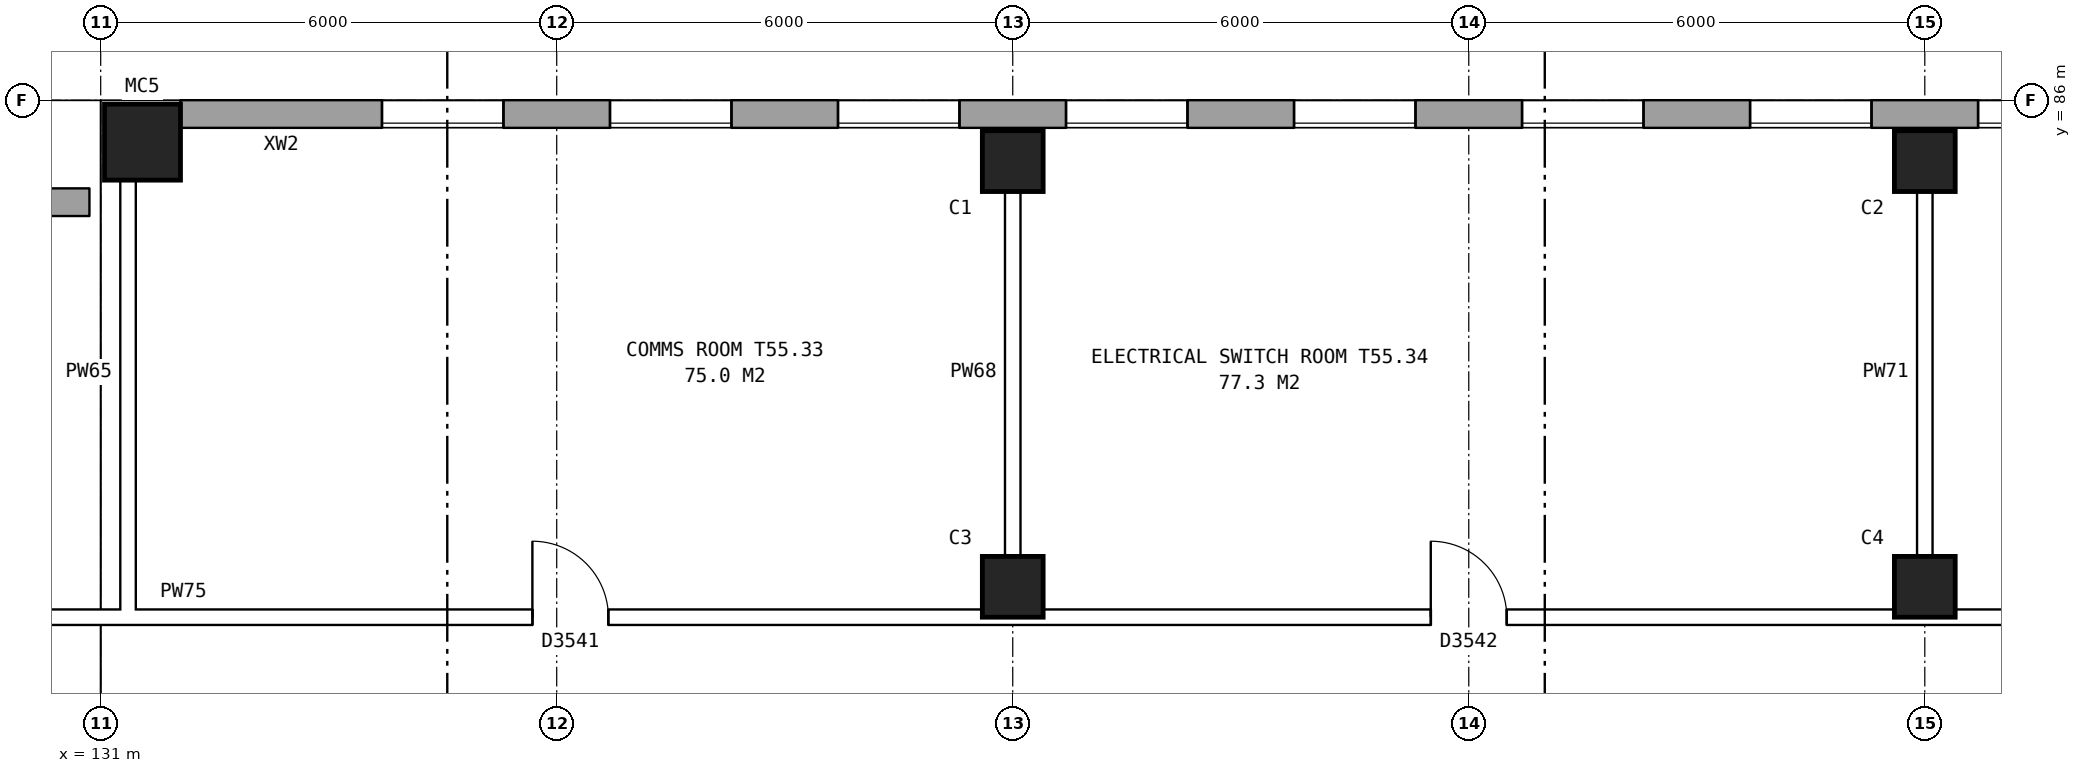
"""IFC4 building model, lengths in metres.
Left out: names, types, materials, properties, quantities, classifications, styles, units other than length and angle.
Written with IfcOpenShell. Run it as: python <this file> out.ifc"""

import sys

from ifc_helpers import new_model, si_unit, direction, frame, frame_2d, origin, origin_2d, place, context, subcontext, project, spatial, rectangle, hollow_rectangle, extrude, element, fill, save


model = new_model("IFC4")
c1 = context("Model", 3, precision=1e-05, world=origin(), true_north=direction((0.0, 1.0)))
c2 = subcontext(c1, "Body", "Model", "MODEL_VIEW")
j1 = project(units=[si_unit("LENGTHUNIT", "METRE"), si_unit("PLANEANGLEUNIT", "RADIAN")], contexts=[c1])
p1 = place(None, origin())
s1 = spatial("IfcSite", under=j1, at=p1, CompositionType="ELEMENT")
p2 = place(p1, origin())
s2 = spatial("IfcBuilding", under=s1, at=p2, CompositionType="ELEMENT")
p3 = place(p2, frame((0.0, 0.0, 194.4)))
s3 = spatial("IfcBuildingStorey", under=s2, at=p3, CompositionType="ELEMENT", Elevation=194.4)
for number, where, z_axis, x_axis in (
    (1, (143.0, 79.6, 0.0), (0.0, 0.0, 1.0), (1.0, 0.0, 0.0)),
    (2, (143.0, 85.2, 0.0), (0.0, 0.0, 1.0), (1.0, 0.0, 0.0)),
    (3, (155.0, 79.6, 0.0), (0.0, 0.0, 1.0), (1.0, 0.0, 0.0)),
    (4, (155.0, 85.2, 0.0), (0.0, 0.0, 1.0), (1.0, 0.0, 0.0)),
):
    element("IfcColumn", number, at=place(p3, frame(where, z_axis=z_axis, x_axis=x_axis)), inside=s3, PredefinedType="COLUMN", context=c2, shape_type="SweptSolid", body=[
        extrude(rectangle(XDim=0.8, YDim=0.8, at=origin_2d()), origin(), (0.0, 0.0, 1.0), 3.95),
    ])
p4 = place(p3, frame((131.55, 85.45, 0.0), z_axis=(0.0, 0.0, 1.0), x_axis=(1.0, 0.0, 0.0)))
e5 = element("IfcColumn", 5, at=p4, inside=s3, PredefinedType="COLUMN", context=c2, shape_type="SweptSolid", body=[
    extrude(hollow_rectangle(XDim=1.0, YDim=1.0, WallThickness=0.055, at=origin_2d()), origin(), (0.0, 0.0, 1.0), 4.2),
])
p5 = place(p3, frame((165.925, 85.82, 0.0), z_axis=(0.0, 0.0, 1.0), x_axis=(-1.0, 0.0, 0.0)))
e6 = element("IfcWall", 6, at=p5, inside=s3, PredefinedType="STANDARD", context=c2, shape_type="SweptSolid", body=[
    extrude(rectangle(XDim=33.875, YDim=0.36, at=frame_2d((16.938, 0.0))), origin(), (0.0, 0.0, 1.0), 3.95),
])
p6 = place(p5, frame((2.625, 0.0, 1.5)))
e7 = element("IfcOpeningElement", 7, at=p6, cuts=e6, PredefinedType="OPENING", context=c2, shape_type="SweptSolid", body=[
    extrude(rectangle(XDim=1.6, YDim=1.2, at=frame_2d((0.8, 0.6))), frame((0.0, 0.19, 0.0), z_axis=(0.0, -1.0, 0.0), x_axis=(1.0, 0.0, 0.0)), (0.0, 0.0, 1.0), 0.38),
])
p7 = place(p5, frame((5.625, 0.0, 1.5)))
e8 = element("IfcOpeningElement", 8, at=p7, cuts=e6, PredefinedType="OPENING", context=c2, shape_type="SweptSolid", body=[
    extrude(rectangle(XDim=1.6, YDim=1.2, at=frame_2d((0.8, 0.6))), frame((0.0, 0.19, 0.0), z_axis=(0.0, -1.0, 0.0), x_axis=(1.0, 0.0, 0.0)), (0.0, 0.0, 1.0), 0.38),
])
p8 = place(p5, frame((8.625, 0.0, 1.5)))
e9 = element("IfcOpeningElement", 9, at=p8, cuts=e6, PredefinedType="OPENING", context=c2, shape_type="SweptSolid", body=[
    extrude(rectangle(XDim=1.6, YDim=1.2, at=frame_2d((0.8, 0.6))), frame((0.0, 0.19, 0.0), z_axis=(0.0, -1.0, 0.0), x_axis=(1.0, 0.0, 0.0)), (0.0, 0.0, 1.0), 0.38),
])
p9 = place(p5, frame((11.625, 0.0, 1.5)))
e10 = element("IfcOpeningElement", 10, at=p9, cuts=e6, PredefinedType="OPENING", context=c2, shape_type="SweptSolid", body=[
    extrude(rectangle(XDim=1.6, YDim=1.2, at=frame_2d((0.8, 0.6))), frame((0.0, 0.19, 0.0), z_axis=(0.0, -1.0, 0.0), x_axis=(1.0, 0.0, 0.0)), (0.0, 0.0, 1.0), 0.38),
])
p10 = place(p5, frame((14.625, 0.0, 1.5)))
e11 = element("IfcOpeningElement", 11, at=p10, cuts=e6, PredefinedType="OPENING", context=c2, shape_type="SweptSolid", body=[
    extrude(rectangle(XDim=1.6, YDim=1.2, at=frame_2d((0.8, 0.6))), frame((0.0, 0.19, 0.0), z_axis=(0.0, -1.0, 0.0), x_axis=(1.0, 0.0, 0.0)), (0.0, 0.0, 1.0), 0.38),
])
p11 = place(p5, frame((17.625, 0.0, 1.5)))
e12 = element("IfcOpeningElement", 12, at=p11, cuts=e6, PredefinedType="OPENING", context=c2, shape_type="SweptSolid", body=[
    extrude(rectangle(XDim=1.6, YDim=1.2, at=frame_2d((0.8, 0.6))), frame((0.0, 0.19, 0.0), z_axis=(0.0, -1.0, 0.0), x_axis=(1.0, 0.0, 0.0)), (0.0, 0.0, 1.0), 0.38),
])
p12 = place(p5, frame((20.625, 0.0, 1.5)))
e13 = element("IfcOpeningElement", 13, at=p12, cuts=e6, PredefinedType="OPENING", context=c2, shape_type="SweptSolid", body=[
    extrude(rectangle(XDim=1.6, YDim=1.2, at=frame_2d((0.8, 0.6))), frame((0.0, 0.19, 0.0), z_axis=(0.0, -1.0, 0.0), x_axis=(1.0, 0.0, 0.0)), (0.0, 0.0, 1.0), 0.38),
])
p13 = place(p5, frame((23.625, 0.0, 1.5)))
e14 = element("IfcOpeningElement", 14, at=p13, cuts=e6, PredefinedType="OPENING", context=c2, shape_type="SweptSolid", body=[
    extrude(rectangle(XDim=1.6, YDim=1.2, at=frame_2d((0.8, 0.6))), frame((0.0, 0.19, 0.0), z_axis=(0.0, -1.0, 0.0), x_axis=(1.0, 0.0, 0.0)), (0.0, 0.0, 1.0), 0.38),
])
p14 = place(p5, frame((26.625, 0.0, 1.5)))
e15 = element("IfcOpeningElement", 15, at=p14, cuts=e6, PredefinedType="OPENING", context=c2, shape_type="SweptSolid", body=[
    extrude(rectangle(XDim=1.6, YDim=1.2, at=frame_2d((0.8, 0.6))), frame((0.0, 0.19, 0.0), z_axis=(0.0, -1.0, 0.0), x_axis=(1.0, 0.0, 0.0)), (0.0, 0.0, 1.0), 0.38),
])
p15 = place(p5, frame((29.625, 0.0, 1.5)))
e16 = element("IfcOpeningElement", 16, at=p15, cuts=e6, PredefinedType="OPENING", context=c2, shape_type="SweptSolid", body=[
    extrude(rectangle(XDim=1.6, YDim=1.2, at=frame_2d((0.8, 0.6))), frame((0.0, 0.19, 0.0), z_axis=(0.0, -1.0, 0.0), x_axis=(1.0, 0.0, 0.0)), (0.0, 0.0, 1.0), 0.38),
])
p16 = place(p3, frame((130.85, 84.66, 0.0), z_axis=(0.0, 0.0, 1.0), x_axis=(-1.0, 0.0, 0.0)))
e17 = element("IfcWall", 17, at=p16, inside=s3, PredefinedType="STANDARD", context=c2, shape_type="SweptSolid", body=[
    extrude(rectangle(XDim=54.7, YDim=0.36, at=frame_2d((27.35, 0.0))), origin(), (0.0, 0.0, 1.0), 3.95),
])
p17 = place(p16, frame((0.769, 0.0, 1.5)))
e18 = element("IfcOpeningElement", 18, at=p17, cuts=e17, PredefinedType="OPENING", context=c2, shape_type="SweptSolid", body=[
    extrude(rectangle(XDim=1.6, YDim=1.2, at=frame_2d((0.8, 0.6))), frame((0.0, 0.19, 0.0), z_axis=(0.0, -1.0, 0.0), x_axis=(1.0, 0.0, 0.0)), (0.0, 0.0, 1.0), 0.38),
])
p18 = place(p16, frame((2.7, 0.0, 1.5)))
e19 = element("IfcOpeningElement", 19, at=p18, cuts=e17, PredefinedType="OPENING", context=c2, shape_type="SweptSolid", body=[
    extrude(rectangle(XDim=0.6, YDim=1.2, at=frame_2d((0.3, 0.6))), frame((0.0, 0.19, 0.0), z_axis=(0.0, -1.0, 0.0), x_axis=(1.0, 0.0, 0.0)), (0.0, 0.0, 1.0), 0.38),
])
p19 = place(p16, frame((7.644, 0.0, 1.5)))
e20 = element("IfcOpeningElement", 20, at=p19, cuts=e17, PredefinedType="OPENING", context=c2, shape_type="SweptSolid", body=[
    extrude(rectangle(XDim=1.6, YDim=1.2, at=frame_2d((0.8, 0.6))), frame((0.0, 0.19, 0.0), z_axis=(0.0, -1.0, 0.0), x_axis=(1.0, 0.0, 0.0)), (0.0, 0.0, 1.0), 0.38),
])
p20 = place(p16, frame((5.3, 0.0, 1.5)))
e21 = element("IfcOpeningElement", 21, at=p20, cuts=e17, PredefinedType="OPENING", context=c2, shape_type="SweptSolid", body=[
    extrude(rectangle(XDim=1.6, YDim=1.2, at=frame_2d((0.8, 0.6))), frame((0.0, 0.19, 0.0), z_axis=(0.0, -1.0, 0.0), x_axis=(1.0, 0.0, 0.0)), (0.0, 0.0, 1.0), 0.38),
])
p21 = place(p16, frame((14.519, 0.0, 1.5)))
e22 = element("IfcOpeningElement", 22, at=p21, cuts=e17, PredefinedType="OPENING", context=c2, shape_type="SweptSolid", body=[
    extrude(rectangle(XDim=1.6, YDim=1.2, at=frame_2d((0.8, 0.6))), frame((0.0, 0.19, 0.0), z_axis=(0.0, -1.0, 0.0), x_axis=(1.0, 0.0, 0.0)), (0.0, 0.0, 1.0), 0.38),
])
p22 = place(p16, frame((16.45, 0.0, 1.5)))
e23 = element("IfcOpeningElement", 23, at=p22, cuts=e17, PredefinedType="OPENING", context=c2, shape_type="SweptSolid", body=[
    extrude(rectangle(XDim=0.6, YDim=1.2, at=frame_2d((0.3, 0.6))), frame((0.0, 0.19, 0.0), z_axis=(0.0, -1.0, 0.0), x_axis=(1.0, 0.0, 0.0)), (0.0, 0.0, 1.0), 0.38),
])
p23 = place(p16, frame((21.394, 0.0, 1.5)))
e24 = element("IfcOpeningElement", 24, at=p23, cuts=e17, PredefinedType="OPENING", context=c2, shape_type="SweptSolid", body=[
    extrude(rectangle(XDim=1.6, YDim=1.2, at=frame_2d((0.8, 0.6))), frame((0.0, 0.19, 0.0), z_axis=(0.0, -1.0, 0.0), x_axis=(1.0, 0.0, 0.0)), (0.0, 0.0, 1.0), 0.38),
])
p24 = place(p16, frame((19.05, 0.0, 1.5)))
e25 = element("IfcOpeningElement", 25, at=p24, cuts=e17, PredefinedType="OPENING", context=c2, shape_type="SweptSolid", body=[
    extrude(rectangle(XDim=1.6, YDim=1.2, at=frame_2d((0.8, 0.6))), frame((0.0, 0.19, 0.0), z_axis=(0.0, -1.0, 0.0), x_axis=(1.0, 0.0, 0.0)), (0.0, 0.0, 1.0), 0.38),
])
p25 = place(p16, frame((27.55, 0.0, 1.5)))
e26 = element("IfcOpeningElement", 26, at=p25, cuts=e17, PredefinedType="OPENING", context=c2, shape_type="SweptSolid", body=[
    extrude(rectangle(XDim=1.2, YDim=1.2, at=frame_2d((0.6, 0.6))), frame((0.0, 0.19, 0.0), z_axis=(0.0, -1.0, 0.0), x_axis=(1.0, 0.0, 0.0)), (0.0, 0.0, 1.0), 0.38),
])
p26 = place(p16, frame((31.706, 0.0, 1.5)))
e27 = element("IfcOpeningElement", 27, at=p26, cuts=e17, PredefinedType="OPENING", context=c2, shape_type="SweptSolid", body=[
    extrude(rectangle(XDim=1.6, YDim=1.2, at=frame_2d((0.8, 0.6))), frame((0.0, 0.19, 0.0), z_axis=(0.0, -1.0, 0.0), x_axis=(1.0, 0.0, 0.0)), (0.0, 0.0, 1.0), 0.38),
])
p27 = place(p16, frame((30.65, 0.0, 1.5)))
e28 = element("IfcOpeningElement", 28, at=p27, cuts=e17, PredefinedType="OPENING", context=c2, shape_type="SweptSolid", body=[
    extrude(rectangle(XDim=0.6, YDim=1.2, at=frame_2d((0.3, 0.6))), frame((0.0, 0.19, 0.0), z_axis=(0.0, -1.0, 0.0), x_axis=(1.0, 0.0, 0.0)), (0.0, 0.0, 1.0), 0.38),
])
p28 = place(p16, frame((38.581, 0.0, 1.5)))
e29 = element("IfcOpeningElement", 29, at=p28, cuts=e17, PredefinedType="OPENING", context=c2, shape_type="SweptSolid", body=[
    extrude(rectangle(XDim=1.6, YDim=1.2, at=frame_2d((0.8, 0.6))), frame((0.0, 0.19, 0.0), z_axis=(0.0, -1.0, 0.0), x_axis=(1.0, 0.0, 0.0)), (0.0, 0.0, 1.0), 0.38),
])
p29 = place(p16, frame((41.3, 0.0, 1.5)))
e30 = element("IfcOpeningElement", 30, at=p29, cuts=e17, PredefinedType="OPENING", context=c2, shape_type="SweptSolid", body=[
    extrude(rectangle(XDim=1.2, YDim=1.2, at=frame_2d((0.6, 0.6))), frame((0.0, 0.19, 0.0), z_axis=(0.0, -1.0, 0.0), x_axis=(1.0, 0.0, 0.0)), (0.0, 0.0, 1.0), 0.38),
])
p30 = place(p16, frame((45.456, 0.0, 1.5)))
e31 = element("IfcOpeningElement", 31, at=p30, cuts=e17, PredefinedType="OPENING", context=c2, shape_type="SweptSolid", body=[
    extrude(rectangle(XDim=1.6, YDim=1.2, at=frame_2d((0.8, 0.6))), frame((0.0, 0.19, 0.0), z_axis=(0.0, -1.0, 0.0), x_axis=(1.0, 0.0, 0.0)), (0.0, 0.0, 1.0), 0.38),
])
p31 = place(p16, frame((44.4, 0.0, 1.5)))
e32 = element("IfcOpeningElement", 32, at=p31, cuts=e17, PredefinedType="OPENING", context=c2, shape_type="SweptSolid", body=[
    extrude(rectangle(XDim=0.6, YDim=1.2, at=frame_2d((0.3, 0.6))), frame((0.0, 0.19, 0.0), z_axis=(0.0, -1.0, 0.0), x_axis=(1.0, 0.0, 0.0)), (0.0, 0.0, 1.0), 0.38),
])
p32 = place(p16, frame((52.331, 0.0, 1.5)))
e33 = element("IfcOpeningElement", 33, at=p32, cuts=e17, PredefinedType="OPENING", context=c2, shape_type="SweptSolid", body=[
    extrude(rectangle(XDim=1.6, YDim=1.2, at=frame_2d((0.8, 0.6))), frame((0.0, 0.19, 0.0), z_axis=(0.0, -1.0, 0.0), x_axis=(1.0, 0.0, 0.0)), (0.0, 0.0, 1.0), 0.38),
])
p33 = place(p16, frame((9.55, 0.0, 1.5)))
e34 = element("IfcOpeningElement", 34, at=p33, cuts=e17, PredefinedType="OPENING", context=c2, shape_type="SweptSolid", body=[
    extrude(rectangle(XDim=0.6, YDim=1.2, at=frame_2d((0.3, 0.6))), frame((0.0, 0.19, 0.0), z_axis=(0.0, -1.0, 0.0), x_axis=(1.0, 0.0, 0.0)), (0.0, 0.0, 1.0), 0.38),
])
p34 = place(p16, frame((12.15, 0.0, 1.5)))
e35 = element("IfcOpeningElement", 35, at=p34, cuts=e17, PredefinedType="OPENING", context=c2, shape_type="SweptSolid", body=[
    extrude(rectangle(XDim=1.2, YDim=1.2, at=frame_2d((0.6, 0.6))), frame((0.0, 0.19, 0.0), z_axis=(0.0, -1.0, 0.0), x_axis=(1.0, 0.0, 0.0)), (0.0, 0.0, 1.0), 0.38),
])
p35 = place(p16, frame((23.3, 0.0, 1.5)))
e36 = element("IfcOpeningElement", 36, at=p35, cuts=e17, PredefinedType="OPENING", context=c2, shape_type="SweptSolid", body=[
    extrude(rectangle(XDim=0.6, YDim=1.2, at=frame_2d((0.3, 0.6))), frame((0.0, 0.19, 0.0), z_axis=(0.0, -1.0, 0.0), x_axis=(1.0, 0.0, 0.0)), (0.0, 0.0, 1.0), 0.38),
])
p36 = place(p16, frame((25.9, 0.0, 1.5)))
e37 = element("IfcOpeningElement", 37, at=p36, cuts=e17, PredefinedType="OPENING", context=c2, shape_type="SweptSolid", body=[
    extrude(rectangle(XDim=1.2, YDim=1.2, at=frame_2d((0.6, 0.6))), frame((0.0, 0.19, 0.0), z_axis=(0.0, -1.0, 0.0), x_axis=(1.0, 0.0, 0.0)), (0.0, 0.0, 1.0), 0.38),
])
p37 = place(p16, frame((33.65, 0.0, 1.5)))
e38 = element("IfcOpeningElement", 38, at=p37, cuts=e17, PredefinedType="OPENING", context=c2, shape_type="SweptSolid", body=[
    extrude(rectangle(XDim=1.6, YDim=1.2, at=frame_2d((0.8, 0.6))), frame((0.0, 0.19, 0.0), z_axis=(0.0, -1.0, 0.0), x_axis=(1.0, 0.0, 0.0)), (0.0, 0.0, 1.0), 0.38),
])
p38 = place(p16, frame((37.5, 0.0, 1.5)))
e39 = element("IfcOpeningElement", 39, at=p38, cuts=e17, PredefinedType="OPENING", context=c2, shape_type="SweptSolid", body=[
    extrude(rectangle(XDim=0.6, YDim=1.2, at=frame_2d((0.3, 0.6))), frame((0.0, 0.19, 0.0), z_axis=(0.0, -1.0, 0.0), x_axis=(1.0, 0.0, 0.0)), (0.0, 0.0, 1.0), 0.38),
])
p39 = place(p16, frame((47.4, 0.0, 1.5)))
e40 = element("IfcOpeningElement", 40, at=p39, cuts=e17, PredefinedType="OPENING", context=c2, shape_type="SweptSolid", body=[
    extrude(rectangle(XDim=1.6, YDim=1.2, at=frame_2d((0.8, 0.6))), frame((0.0, 0.19, 0.0), z_axis=(0.0, -1.0, 0.0), x_axis=(1.0, 0.0, 0.0)), (0.0, 0.0, 1.0), 0.38),
])
p40 = place(p16, frame((51.25, 0.0, 1.5)))
e41 = element("IfcOpeningElement", 41, at=p40, cuts=e17, PredefinedType="OPENING", context=c2, shape_type="SweptSolid", body=[
    extrude(rectangle(XDim=0.6, YDim=1.2, at=frame_2d((0.3, 0.6))), frame((0.0, 0.19, 0.0), z_axis=(0.0, -1.0, 0.0), x_axis=(1.0, 0.0, 0.0)), (0.0, 0.0, 1.0), 0.38),
])
p41 = place(p3, frame((103.4, 79.2, 0.0), z_axis=(0.0, 0.0, 1.0), x_axis=(1.0, 0.0, 0.0)))
e42 = element("IfcWall", 42, at=p41, inside=s3, PredefinedType="PARTITIONING", context=c2, shape_type="SweptSolid", body=[
    extrude(rectangle(XDim=65.36, YDim=0.2, at=frame_2d((32.68, 0.0))), origin(), (0.0, 0.0, 1.0), 3.95),
])
p42 = place(p41, frame((6.475, 0.0, 0.0)))
e43 = element("IfcOpeningElement", 43, at=p42, cuts=e42, PredefinedType="OPENING", context=c2, shape_type="SweptSolid", body=[
    extrude(rectangle(XDim=1.0, YDim=2.1, at=frame_2d((0.5, 1.05))), frame((0.0, 0.11, 0.0), z_axis=(0.0, -1.0, 0.0), x_axis=(1.0, 0.0, 0.0)), (0.0, 0.0, 1.0), 0.22),
])
p43 = place(p41, frame((20.405, 0.0, 0.0)))
e44 = element("IfcOpeningElement", 44, at=p43, cuts=e42, PredefinedType="OPENING", context=c2, shape_type="SweptSolid", body=[
    extrude(rectangle(XDim=1.0, YDim=2.1, at=frame_2d((0.5, 1.05))), frame((0.0, 0.11, 0.0), z_axis=(0.0, -1.0, 0.0), x_axis=(1.0, 0.0, 0.0)), (0.0, 0.0, 1.0), 0.22),
])
p44 = place(p41, frame((33.28, 0.0, 0.0)))
e45 = element("IfcOpeningElement", 45, at=p44, cuts=e42, PredefinedType="OPENING", context=c2, shape_type="SweptSolid", body=[
    extrude(rectangle(XDim=1.0, YDim=2.1, at=frame_2d((0.5, 1.05))), frame((0.0, 0.11, 0.0), z_axis=(0.0, -1.0, 0.0), x_axis=(1.0, 0.0, 0.0)), (0.0, 0.0, 1.0), 0.22),
])
p45 = place(p41, frame((45.1, 0.0, 0.0)))
e46 = element("IfcOpeningElement", 46, at=p45, cuts=e42, PredefinedType="OPENING", context=c2, shape_type="SweptSolid", body=[
    extrude(rectangle(XDim=1.0, YDim=2.1, at=frame_2d((0.5, 1.05))), frame((0.0, 0.11, 0.0), z_axis=(0.0, -1.0, 0.0), x_axis=(1.0, 0.0, 0.0)), (0.0, 0.0, 1.0), 0.22),
])
p46 = place(p41, frame((57.92, 0.0, 0.0)))
e47 = element("IfcOpeningElement", 47, at=p46, cuts=e42, PredefinedType="OPENING", context=c2, shape_type="SweptSolid", body=[
    extrude(rectangle(XDim=1.0, YDim=2.1, at=frame_2d((0.5, 1.05))), frame((0.0, 0.11, 0.0), z_axis=(0.0, -1.0, 0.0), x_axis=(1.0, 0.0, 0.0)), (0.0, 0.0, 1.0), 0.22),
])
for number, where, z_axis, x_axis in (
    (48, (131.36, 79.1, 0.0), (0.0, 0.0, 1.0), (0.0, 1.0, 0.0)),
    (49, (143.0, 79.1, 0.0), (0.0, 0.0, 1.0), (0.0, 1.0, 0.0)),
    (50, (155.0, 79.1, 0.0), (0.0, 0.0, 1.0), (0.0, 1.0, 0.0)),
):
    element("IfcWall", number, at=place(p3, frame(where, z_axis=z_axis, x_axis=x_axis)), inside=s3, PredefinedType="PARTITIONING", context=c2, shape_type="SweptSolid", body=[
        extrude(rectangle(XDim=6.66, YDim=0.2, at=frame_2d((3.33, 0.0))), origin(), (0.0, 0.0, 1.0), 3.95),
    ])
p47 = place(p8, origin())
e51 = element("IfcWindow", 51, at=p47, inside=s3, PartitioningType="DOUBLE_PANEL_HORIZONTAL", PredefinedType="WINDOW", context=c2, shape_type="SweptSolid", body=[
    extrude(rectangle(XDim=1.6, YDim=1.2, at=frame_2d((0.8, 0.6))), frame((0.0, 0.15, 0.0), z_axis=(0.0, -1.0, 0.0), x_axis=(1.0, 0.0, 0.0)), (0.0, 0.0, 1.0), 0.06),
])
fill(e9, e51)
p48 = place(p9, origin())
e52 = element("IfcWindow", 52, at=p48, inside=s3, PartitioningType="DOUBLE_PANEL_HORIZONTAL", PredefinedType="WINDOW", context=c2, shape_type="SweptSolid", body=[
    extrude(rectangle(XDim=1.6, YDim=1.2, at=frame_2d((0.8, 0.6))), frame((0.0, 0.15, 0.0), z_axis=(0.0, -1.0, 0.0), x_axis=(1.0, 0.0, 0.0)), (0.0, 0.0, 1.0), 0.06),
])
fill(e10, e52)
p49 = place(p10, origin())
e53 = element("IfcWindow", 53, at=p49, inside=s3, PartitioningType="DOUBLE_PANEL_HORIZONTAL", PredefinedType="WINDOW", context=c2, shape_type="SweptSolid", body=[
    extrude(rectangle(XDim=1.6, YDim=1.2, at=frame_2d((0.8, 0.6))), frame((0.0, 0.15, 0.0), z_axis=(0.0, -1.0, 0.0), x_axis=(1.0, 0.0, 0.0)), (0.0, 0.0, 1.0), 0.06),
])
fill(e11, e53)
p50 = place(p11, origin())
e54 = element("IfcWindow", 54, at=p50, inside=s3, PartitioningType="DOUBLE_PANEL_HORIZONTAL", PredefinedType="WINDOW", context=c2, shape_type="SweptSolid", body=[
    extrude(rectangle(XDim=1.6, YDim=1.2, at=frame_2d((0.8, 0.6))), frame((0.0, 0.15, 0.0), z_axis=(0.0, -1.0, 0.0), x_axis=(1.0, 0.0, 0.0)), (0.0, 0.0, 1.0), 0.06),
])
fill(e12, e54)
p51 = place(p12, origin())
e55 = element("IfcWindow", 55, at=p51, inside=s3, PartitioningType="DOUBLE_PANEL_HORIZONTAL", PredefinedType="WINDOW", context=c2, shape_type="SweptSolid", body=[
    extrude(rectangle(XDim=1.6, YDim=1.2, at=frame_2d((0.8, 0.6))), frame((0.0, 0.15, 0.0), z_axis=(0.0, -1.0, 0.0), x_axis=(1.0, 0.0, 0.0)), (0.0, 0.0, 1.0), 0.06),
])
fill(e13, e55)
p52 = place(p13, origin())
e56 = element("IfcWindow", 56, at=p52, inside=s3, PartitioningType="DOUBLE_PANEL_HORIZONTAL", PredefinedType="WINDOW", context=c2, shape_type="SweptSolid", body=[
    extrude(rectangle(XDim=1.6, YDim=1.2, at=frame_2d((0.8, 0.6))), frame((0.0, 0.15, 0.0), z_axis=(0.0, -1.0, 0.0), x_axis=(1.0, 0.0, 0.0)), (0.0, 0.0, 1.0), 0.06),
])
fill(e14, e56)
p53 = place(p14, origin())
e57 = element("IfcWindow", 57, at=p53, inside=s3, PartitioningType="DOUBLE_PANEL_HORIZONTAL", PredefinedType="WINDOW", context=c2, shape_type="SweptSolid", body=[
    extrude(rectangle(XDim=1.6, YDim=1.2, at=frame_2d((0.8, 0.6))), frame((0.0, 0.15, 0.0), z_axis=(0.0, -1.0, 0.0), x_axis=(1.0, 0.0, 0.0)), (0.0, 0.0, 1.0), 0.06),
])
fill(e15, e57)
p54 = place(p15, origin())
e58 = element("IfcWindow", 58, at=p54, inside=s3, PartitioningType="DOUBLE_PANEL_HORIZONTAL", PredefinedType="WINDOW", context=c2, shape_type="SweptSolid", body=[
    extrude(rectangle(XDim=1.6, YDim=1.2, at=frame_2d((0.8, 0.6))), frame((0.0, 0.15, 0.0), z_axis=(0.0, -1.0, 0.0), x_axis=(1.0, 0.0, 0.0)), (0.0, 0.0, 1.0), 0.06),
])
fill(e16, e58)
p55 = place(p44, origin())
e59 = element("IfcDoor", 59, at=p55, inside=s3, OperationType="SINGLE_SWING_LEFT", PredefinedType="DOOR", context=c2, shape_type="SweptSolid", body=[
    extrude(rectangle(XDim=1.0, YDim=2.1, at=frame_2d((0.5, 1.05))), frame((0.0, 0.025, 0.0), z_axis=(0.0, -1.0, 0.0), x_axis=(1.0, 0.0, 0.0)), (0.0, 0.0, 1.0), 0.05),
])
fill(e45, e59)
p56 = place(p45, origin())
e60 = element("IfcDoor", 60, at=p56, inside=s3, OperationType="SINGLE_SWING_LEFT", PredefinedType="DOOR", context=c2, shape_type="SweptSolid", body=[
    extrude(rectangle(XDim=1.0, YDim=2.1, at=frame_2d((0.5, 1.05))), frame((0.0, 0.025, 0.0), z_axis=(0.0, -1.0, 0.0), x_axis=(1.0, 0.0, 0.0)), (0.0, 0.0, 1.0), 0.05),
])
fill(e46, e60)
save(model, sys.argv[1])
